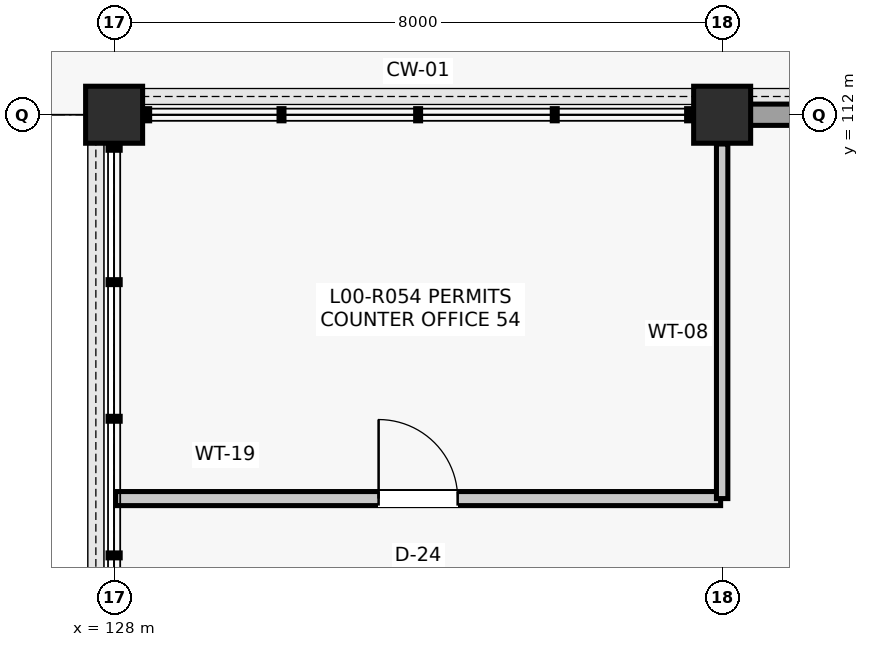
"""IFC4 building model, lengths in metres.
Left out: names, types, materials, properties, quantities, classifications, styles, units other than length and angle.
Written with IfcOpenShell. Run it as: python <this file> out.ifc"""

import sys

from ifc_helpers import new_model, si_unit, direction, frame, frame_2d, origin, origin_2d, place, context, subcontext, project, spatial, rectangle, extrude, element, fill, save


model = new_model("IFC4")
c1 = context("Model", 3, precision=1e-05, world=origin(), true_north=direction((0.0, 1.0)))
c2 = subcontext(c1, "Body", "Model", "MODEL_VIEW")
j1 = project(units=[si_unit("LENGTHUNIT", "METRE"), si_unit("PLANEANGLEUNIT", "RADIAN")], contexts=[c1])
p1 = place(None, origin())
s1 = spatial("IfcSite", under=j1, at=p1, CompositionType="ELEMENT")
p2 = place(p1, origin())
s2 = spatial("IfcBuilding", under=s1, at=p2, CompositionType="ELEMENT")
p3 = place(p2, origin())
s3 = spatial("IfcBuildingStorey", under=s2, at=p3, CompositionType="ELEMENT", Elevation=0.0)
for number, where, z_axis, x_axis in (
    (1, (128.0, 112.0, 0.0), (0.0, 0.0, 1.0), (1.0, 0.0, 0.0)),
    (2, (136.0, 112.0, 0.0), (0.0, 0.0, 1.0), (1.0, 0.0, 0.0)),
):
    element("IfcColumn", number, at=place(p3, frame(where, z_axis=z_axis, x_axis=x_axis)), inside=s3, PredefinedType="COLUMN", context=c2, shape_type="SweptSolid", body=[
        extrude(rectangle(XDim=0.75, YDim=0.75, at=origin_2d()), origin(), (0.0, 0.0, 1.0), 5.28),
    ])
p4 = place(p3, frame((136.36, 112.0, 0.0), z_axis=(0.0, 0.0, 1.0), x_axis=(1.0, 0.0, 0.0)))
e3 = element("IfcWall", 3, at=p4, inside=s3, PredefinedType="SOLIDWALL", context=c2, shape_type="SweptSolid", body=[
    extrude(rectangle(XDim=7.28, YDim=0.28, at=frame_2d((3.64, 0.0))), origin(), (0.0, 0.0, 1.0), 4.677),
])
p5 = place(p4, frame((2.54, 0.0, 0.0)))
e4 = element("IfcOpeningElement", 4, at=p5, cuts=e3, PredefinedType="OPENING", context=c2, shape_type="SweptSolid", body=[
    extrude(rectangle(XDim=2.2, YDim=2.5, at=frame_2d((1.1, 1.25))), frame((0.0, 0.15, 0.0), z_axis=(0.0, -1.0, 0.0), x_axis=(1.0, 0.0, 0.0)), (0.0, 0.0, 1.0), 0.3),
])
p6 = place(p3, frame((128.02, 106.95, 0.0), z_axis=(0.0, 0.0, 1.0), x_axis=(1.0, 0.0, 0.0)))
e5 = element("IfcWall", 5, at=p6, inside=s3, PredefinedType="PARTITIONING", context=c2, shape_type="SweptSolid", body=[
    extrude(rectangle(XDim=7.96, YDim=0.185, at=frame_2d((3.98, 0.0))), origin(), (0.0, 0.0, 1.0), 4.404),
])
p7 = place(p6, frame((3.46, 0.0, 0.0)))
e6 = element("IfcOpeningElement", 6, at=p7, cuts=e5, PredefinedType="OPENING", context=c2, shape_type="SweptSolid", body=[
    extrude(rectangle(XDim=1.04, YDim=2.18, at=frame_2d((0.52, 1.09))), frame((0.0, 0.103, 0.0), z_axis=(0.0, -1.0, 0.0), x_axis=(1.0, 0.0, 0.0)), (0.0, 0.0, 1.0), 0.205),
])
p8 = place(p3, frame((136.0, 106.95, 0.0), z_axis=(0.0, 0.0, 1.0), x_axis=(0.0, 1.0, 0.0)))
e7 = element("IfcWall", 7, at=p8, inside=s3, PredefinedType="PARTITIONING", context=c2, shape_type="SweptSolid", body=[
    extrude(rectangle(XDim=4.665, YDim=0.15, at=frame_2d((2.333, 0.0))), origin(), (0.0, 0.0, 1.0), 4.404),
])
p9 = place(p7, origin())
e8 = element("IfcDoor", 8, at=p9, inside=s3, OperationType="SINGLE_SWING_LEFT", PredefinedType="DOOR", context=c2, shape_type="SweptSolid", body=[
    extrude(rectangle(XDim=1.04, YDim=2.18, at=frame_2d((0.52, 1.09))), frame((0.0, 0.025, 0.0), z_axis=(0.0, -1.0, 0.0), x_axis=(1.0, 0.0, 0.0)), (0.0, 0.0, 1.0), 0.05),
])
fill(e6, e8)
save(model, sys.argv[1])
